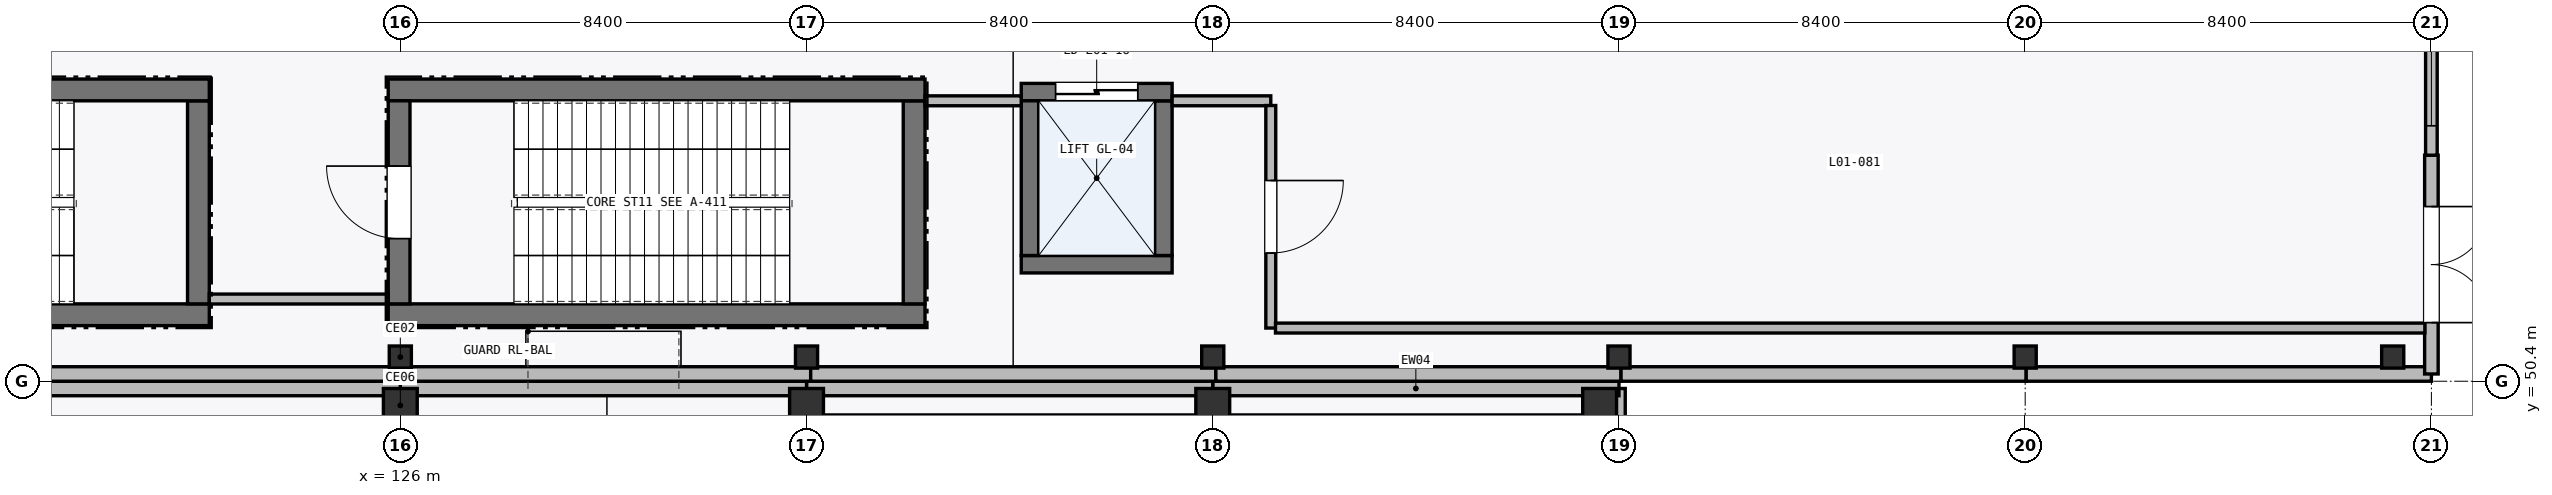
"""IFC4 building model, lengths in metres.
Left out: names, types, materials, properties, quantities, classifications, styles, units other than length and angle.
Written with IfcOpenShell. Run it as: python <this file> out.ifc"""

import sys

from ifc_helpers import new_model, si_unit, direction, frame, frame_2d, origin, origin_2d, place, context, subcontext, project, spatial, rectangle, hollow_circle, extrude, element, fill, save


model = new_model("IFC4")
c1 = context("Model", 3, precision=1e-05, world=origin(), true_north=direction((0.0, 1.0)))
c2 = subcontext(c1, "Body", "Model", "MODEL_VIEW")
j1 = project(units=[si_unit("LENGTHUNIT", "METRE"), si_unit("PLANEANGLEUNIT", "RADIAN")], contexts=[c1])
p1 = place(None, origin())
s1 = spatial("IfcSite", under=j1, at=p1, CompositionType="ELEMENT")
p2 = place(p1, origin())
s2 = spatial("IfcBuilding", under=s1, at=p2, CompositionType="ELEMENT")
p3 = place(p2, origin())
s3 = spatial("IfcBuildingStorey", under=s2, at=p3, CompositionType="ELEMENT", Elevation=0.0)
for number, where, z_axis, x_axis in (
    (1, (126.0, 49.9, 0.0), (0.0, 0.0, 1.0), (1.0, 0.0, 0.0)),
    (2, (134.4, 49.9, 0.0), (0.0, 0.0, 1.0), (1.0, 0.0, 0.0)),
    (3, (142.8, 49.9, 0.0), (0.0, 0.0, 1.0), (1.0, 0.0, 0.0)),
    (4, (150.8, 49.9, 0.0), (0.0, 0.0, 1.0), (1.0, 0.0, 0.0)),
):
    element("IfcColumn", number, at=place(p3, frame(where, z_axis=z_axis, x_axis=x_axis)), inside=s3, PredefinedType="COLUMN", context=c2, shape_type="SweptSolid", body=[
        extrude(rectangle(XDim=0.7, YDim=0.7, at=origin_2d()), origin(), (0.0, 0.0, 1.0), 6.0),
    ])
for number, where, z_axis, x_axis in (
    (5, (126.0, 50.9, 0.0), (0.0, 0.0, 1.0), (1.0, 0.0, 0.0)),
    (6, (134.4, 50.9, 0.0), (0.0, 0.0, 1.0), (1.0, 0.0, 0.0)),
    (7, (142.8, 50.9, 0.0), (0.0, 0.0, 1.0), (1.0, 0.0, 0.0)),
    (8, (151.2, 50.9, 0.0), (0.0, 0.0, 1.0), (1.0, 0.0, 0.0)),
    (9, (159.6, 50.9, 0.0), (0.0, 0.0, 1.0), (1.0, 0.0, 0.0)),
    (10, (167.2, 50.9, 0.0), (0.0, 0.0, 1.0), (1.0, 0.0, 0.0)),
):
    element("IfcColumn", number, at=place(p3, frame(where, z_axis=z_axis, x_axis=x_axis)), inside=s3, PredefinedType="COLUMN", context=c2, shape_type="SweptSolid", body=[
        extrude(hollow_circle(Radius=0.229, WallThickness=0.016, at=origin_2d()), origin(), (0.0, 0.0, 1.0), 6.0),
    ])
p4 = place(p3, frame((151.2, 41.88, 0.0), z_axis=(0.0, 0.0, 1.0), x_axis=(0.0, 1.0, 0.0)))
e11 = element("IfcWall", 11, at=p4, inside=s3, PredefinedType="STANDARD", context=c2, shape_type="SweptSolid", body=[
    extrude(rectangle(XDim=8.37, YDim=0.26, at=frame_2d((4.185, 0.0))), origin(), (0.0, 0.0, 1.0), 5.745),
])
p5 = place(p4, frame((3.035, 0.0, 0.0)))
e12 = element("IfcOpeningElement", 12, at=p5, cuts=e11, PredefinedType="OPENING", context=c2, shape_type="SweptSolid", body=[
    extrude(rectangle(XDim=2.3, YDim=2.4, at=frame_2d((1.15, 1.2))), frame((0.0, 0.14, 0.0), z_axis=(0.0, -1.0, 0.0), x_axis=(1.0, 0.0, 0.0)), (0.0, 0.0, 1.0), 0.28),
])
p6 = place(p3, frame((151.2, 50.25, 0.0), z_axis=(0.0, 0.0, 1.0), x_axis=(-1.0, 0.0, 0.0)))
e13 = element("IfcWall", 13, at=p6, inside=s3, PredefinedType="STANDARD", context=c2, shape_type="SweptSolid", body=[
    extrude(rectangle(XDim=8.4, YDim=0.3, at=frame_2d((4.2, 0.0))), origin(), (0.0, 0.0, 1.0), 5.231),
])
p7 = place(p3, frame((142.8, 50.25, 0.0), z_axis=(0.0, 0.0, 1.0), x_axis=(-1.0, 0.0, 0.0)))
e14 = element("IfcWall", 14, at=p7, inside=s3, PredefinedType="STANDARD", context=c2, shape_type="SweptSolid", body=[
    extrude(rectangle(XDim=8.4, YDim=0.3, at=frame_2d((4.2, 0.0))), origin(), (0.0, 0.0, 1.0), 5.231),
])
for number, where, z_axis, x_axis in (
    (15, (134.4, 50.25, 0.0), (0.0, 0.0, 1.0), (-1.0, 0.0, 0.0)),
    (16, (126.0, 50.25, 0.0), (0.0, 0.0, 1.0), (-1.0, 0.0, 0.0)),
):
    element("IfcWall", number, at=place(p3, frame(where, z_axis=z_axis, x_axis=x_axis)), inside=s3, PredefinedType="STANDARD", context=c2, shape_type="SweptSolid", body=[
        extrude(rectangle(XDim=8.4, YDim=0.3, at=frame_2d((4.2, 0.0))), origin(), (0.0, 0.0, 1.0), 5.231),
    ])
p8 = place(p3, frame((117.729, 50.55, 0.0), z_axis=(0.0, 0.0, 1.0), x_axis=(1.0, 0.0, 0.0)))
e17 = element("IfcWall", 17, at=p8, inside=s3, PredefinedType="STANDARD", context=c2, shape_type="SweptSolid", body=[
    extrude(rectangle(XDim=8.379, YDim=0.3, at=frame_2d((4.189, 0.0))), origin(), (0.0, 0.0, 1.0), 5.297),
])
p9 = place(p3, frame((126.107, 50.55, 0.0), z_axis=(0.0, 0.0, 1.0), x_axis=(1.0, 0.0, 0.0)))
e18 = element("IfcWall", 18, at=p9, inside=s3, PredefinedType="STANDARD", context=c2, shape_type="SweptSolid", body=[
    extrude(rectangle(XDim=8.378, YDim=0.3, at=frame_2d((4.189, 0.0))), origin(), (0.0, 0.0, 1.0), 5.297),
])
for number, where, z_axis, x_axis in (
    (19, (134.486, 50.55, 0.0), (0.0, 0.0, 1.0), (1.0, 0.0, 0.0)),
    (20, (142.864, 50.55, 0.0), (0.0, 0.0, 1.0), (1.0, 0.0, 0.0)),
):
    element("IfcWall", number, at=place(p3, frame(where, z_axis=z_axis, x_axis=x_axis)), inside=s3, PredefinedType="STANDARD", context=c2, shape_type="SweptSolid", body=[
        extrude(rectangle(XDim=8.379, YDim=0.3, at=frame_2d((4.189, 0.0))), origin(), (0.0, 0.0, 1.0), 5.297),
    ])
p10 = place(p3, frame((151.243, 50.55, 0.0), z_axis=(0.0, 0.0, 1.0), x_axis=(1.0, 0.0, 0.0)))
e21 = element("IfcWall", 21, at=p10, inside=s3, PredefinedType="STANDARD", context=c2, shape_type="SweptSolid", body=[
    extrude(rectangle(XDim=8.378, YDim=0.3, at=frame_2d((4.189, 0.0))), origin(), (0.0, 0.0, 1.0), 5.297),
])
p11 = place(p3, frame((159.621, 50.55, 0.0), z_axis=(0.0, 0.0, 1.0), x_axis=(1.0, 0.0, 0.0)))
e22 = element("IfcWall", 22, at=p11, inside=s3, PredefinedType="STANDARD", context=c2, shape_type="SweptSolid", body=[
    extrude(rectangle(XDim=8.379, YDim=0.3, at=frame_2d((4.189, 0.0))), origin(), (0.0, 0.0, 1.0), 5.297),
])
p12 = place(p3, frame((168.0, 50.55, 0.0), z_axis=(0.0, 0.0, 1.0), x_axis=(0.0, 1.0, 0.0)))
e23 = element("IfcWall", 23, at=p12, inside=s3, PredefinedType="STANDARD", context=c2, shape_type="SweptSolid", body=[
    extrude(rectangle(XDim=4.525, YDim=0.28, at=frame_2d((2.262, 0.0))), origin(), (0.0, 0.0, 1.0), 5.745),
])
p13 = place(p12, frame((1.062, 0.0, 0.0)))
e24 = element("IfcOpeningElement", 24, at=p13, cuts=e23, PredefinedType="OPENING", context=c2, shape_type="SweptSolid", body=[
    extrude(rectangle(XDim=2.4, YDim=2.4, at=frame_2d((1.2, 1.2))), frame((0.0, 0.15, 0.0), z_axis=(0.0, -1.0, 0.0), x_axis=(1.0, 0.0, 0.0)), (0.0, 0.0, 1.0), 0.3),
])
p14 = place(p3, frame((168.0, 55.075, 0.0), z_axis=(0.0, 0.0, 1.0), x_axis=(0.0, 1.0, 0.0)))
e25 = element("IfcWall", 25, at=p14, inside=s3, PredefinedType="STANDARD", context=c2, shape_type="SweptSolid", body=[
    extrude(rectangle(XDim=4.525, YDim=0.24, at=frame_2d((2.263, 0.0))), origin(), (0.0, 0.0, 1.0), 5.745),
])
p15 = place(p14, frame((0.608, 0.0, 0.95)))
e26 = element("IfcOpeningElement", 26, at=p15, cuts=e25, PredefinedType="OPENING", context=c2, shape_type="SweptSolid", body=[
    extrude(rectangle(XDim=1.68, YDim=1.8, at=frame_2d((0.84, 0.9))), frame((0.0, 0.13, 0.0), z_axis=(0.0, -1.0, 0.0), x_axis=(1.0, 0.0, 0.0)), (0.0, 0.0, 1.0), 0.26),
])
p16 = place(p3, frame((110.95, 51.775, 0.0), z_axis=(0.0, 0.0, 1.0), x_axis=(1.0, 0.0, 0.0)))
e27 = element("IfcWall", 27, at=p16, inside=s3, PredefinedType="SHEAR", context=c2, shape_type="SweptSolid", body=[
    extrude(rectangle(XDim=11.1, YDim=0.45, at=frame_2d((5.55, 0.0))), origin(), (0.0, 0.0, 1.0), 5.745),
])
p17 = place(p3, frame((121.825, 52.0, 0.0), z_axis=(0.0, 0.0, 1.0), x_axis=(0.0, 1.0, 0.0)))
e28 = element("IfcWall", 28, at=p17, inside=s3, PredefinedType="SHEAR", context=c2, shape_type="SweptSolid", body=[
    extrude(rectangle(XDim=4.2, YDim=0.45, at=frame_2d((2.1, 0.0))), origin(), (0.0, 0.0, 1.0), 5.745),
])
for number, where, z_axis, x_axis in (
    (29, (122.05, 56.425, 0.0), (0.0, 0.0, 1.0), (-1.0, 0.0, 0.0)),
    (30, (125.75, 51.775, 0.0), (0.0, 0.0, 1.0), (1.0, 0.0, 0.0)),
):
    element("IfcWall", number, at=place(p3, frame(where, z_axis=z_axis, x_axis=x_axis)), inside=s3, PredefinedType="SHEAR", context=c2, shape_type="SweptSolid", body=[
        extrude(rectangle(XDim=11.1, YDim=0.45, at=frame_2d((5.55, 0.0))), origin(), (0.0, 0.0, 1.0), 5.745),
    ])
p18 = place(p3, frame((136.625, 52.0, 0.0), z_axis=(0.0, 0.0, 1.0), x_axis=(0.0, 1.0, 0.0)))
e31 = element("IfcWall", 31, at=p18, inside=s3, PredefinedType="SHEAR", context=c2, shape_type="SweptSolid", body=[
    extrude(rectangle(XDim=4.2, YDim=0.45, at=frame_2d((2.1, 0.0))), origin(), (0.0, 0.0, 1.0), 5.745),
])
p19 = place(p3, frame((136.85, 56.425, 0.0), z_axis=(0.0, 0.0, 1.0), x_axis=(-1.0, 0.0, 0.0)))
e32 = element("IfcWall", 32, at=p19, inside=s3, PredefinedType="SHEAR", context=c2, shape_type="SweptSolid", body=[
    extrude(rectangle(XDim=11.1, YDim=0.45, at=frame_2d((5.55, 0.0))), origin(), (0.0, 0.0, 1.0), 5.745),
])
p20 = place(p3, frame((125.975, 56.2, 0.0), z_axis=(0.0, 0.0, 1.0), x_axis=(0.0, -1.0, 0.0)))
e33 = element("IfcWall", 33, at=p20, inside=s3, PredefinedType="SHEAR", context=c2, shape_type="SweptSolid", body=[
    extrude(rectangle(XDim=4.2, YDim=0.45, at=frame_2d((2.1, 0.0))), origin(), (0.0, 0.0, 1.0), 5.745),
])
p21 = place(p20, frame((1.35, 0.0, 0.0)))
e34 = element("IfcOpeningElement", 34, at=p21, cuts=e33, PredefinedType="OPENING", context=c2, shape_type="SweptSolid", body=[
    extrude(rectangle(XDim=1.5, YDim=2.15, at=frame_2d((0.75, 1.075))), frame((0.0, 0.235, 0.0), z_axis=(0.0, -1.0, 0.0), x_axis=(1.0, 0.0, 0.0)), (0.0, 0.0, 1.0), 0.47),
])
p22 = place(p3, frame((138.84, 52.82, 0.0), z_axis=(0.0, 0.0, 1.0), x_axis=(1.0, 0.0, 0.0)))
e35 = element("IfcWall", 35, at=p22, inside=s3, PredefinedType="SHEAR", context=c2, shape_type="SweptSolid", body=[
    extrude(rectangle(XDim=3.12, YDim=0.36, at=frame_2d((1.56, 0.0))), origin(), (0.0, 0.0, 1.0), 5.745),
])
p23 = place(p3, frame((141.78, 53.0, 0.0), z_axis=(0.0, 0.0, 1.0), x_axis=(0.0, 1.0, 0.0)))
e36 = element("IfcWall", 36, at=p23, inside=s3, PredefinedType="SHEAR", context=c2, shape_type="SweptSolid", body=[
    extrude(rectangle(XDim=3.2, YDim=0.36, at=frame_2d((1.6, 0.0))), origin(), (0.0, 0.0, 1.0), 5.745),
])
p24 = place(p3, frame((141.96, 56.38, 0.0), z_axis=(0.0, 0.0, 1.0), x_axis=(-1.0, 0.0, 0.0)))
e37 = element("IfcWall", 37, at=p24, inside=s3, PredefinedType="SHEAR", context=c2, shape_type="SweptSolid", body=[
    extrude(rectangle(XDim=3.12, YDim=0.36, at=frame_2d((1.56, 0.0))), origin(), (0.0, 0.0, 1.0), 5.745),
])
p25 = place(p24, frame((0.71, 0.0, 0.0)))
e38 = element("IfcOpeningElement", 38, at=p25, cuts=e37, PredefinedType="OPENING", context=c2, shape_type="SweptSolid", body=[
    extrude(rectangle(XDim=1.7, YDim=2.3, at=frame_2d((0.85, 1.15))), frame((0.0, 0.19, 0.0), z_axis=(0.0, -1.0, 0.0), x_axis=(1.0, 0.0, 0.0)), (0.0, 0.0, 1.0), 0.38),
])
p26 = place(p3, frame((139.02, 56.2, 0.0), z_axis=(0.0, 0.0, 1.0), x_axis=(0.0, -1.0, 0.0)))
e39 = element("IfcWall", 39, at=p26, inside=s3, PredefinedType="SHEAR", context=c2, shape_type="SweptSolid", body=[
    extrude(rectangle(XDim=3.2, YDim=0.36, at=frame_2d((1.6, 0.0))), origin(), (0.0, 0.0, 1.0), 5.745),
])
p27 = place(p3, frame((151.075, 49.6, 0.0), z_axis=(0.0, 0.0, 1.0), x_axis=(-1.0, 0.0, 0.0)))
e40 = element("IfcWall", 40, at=p27, inside=s3, PredefinedType="PARTITIONING", context=c2, shape_type="SweptSolid", body=[
    extrude(rectangle(XDim=16.275, YDim=0.205, at=frame_2d((8.137, 0.0))), origin(), (0.0, 0.0, 1.0), 5.231),
])
p28 = place(p3, frame((136.85, 56.2, 0.0), z_axis=(0.0, 0.0, 1.0), x_axis=(1.0, 0.0, 0.0)))
e41 = element("IfcWall", 41, at=p28, inside=s3, PredefinedType="PARTITIONING", context=c2, shape_type="SweptSolid", body=[
    extrude(rectangle(XDim=1.99, YDim=0.205, at=frame_2d((0.995, 0.0))), origin(), (0.0, 0.0, 1.0), 5.745),
])
p29 = place(p3, frame((141.96, 56.2, 0.0), z_axis=(0.0, 0.0, 1.0), x_axis=(1.0, 0.0, 0.0)))
e42 = element("IfcWall", 42, at=p29, inside=s3, PredefinedType="PARTITIONING", context=c2, shape_type="SweptSolid", body=[
    extrude(rectangle(XDim=2.04, YDim=0.205, at=frame_2d((1.02, 0.0))), origin(), (0.0, 0.0, 1.0), 5.745),
])
p30 = place(p3, frame((144.0, 56.103, 0.0), z_axis=(0.0, 0.0, 1.0), x_axis=(0.0, -1.0, 0.0)))
e43 = element("IfcWall", 43, at=p30, inside=s3, PredefinedType="PARTITIONING", context=c2, shape_type="SweptSolid", body=[
    extrude(rectangle(XDim=4.603, YDim=0.205, at=frame_2d((2.301, 0.0))), origin(), (0.0, 0.0, 1.0), 5.745),
])
p31 = place(p30, frame((1.551, 0.0, 0.0)))
e44 = element("IfcOpeningElement", 44, at=p31, cuts=e43, PredefinedType="OPENING", context=c2, shape_type="SweptSolid", body=[
    extrude(rectangle(XDim=1.5, YDim=2.15, at=frame_2d((0.75, 1.075))), frame((0.0, 0.113, 0.0), z_axis=(0.0, -1.0, 0.0), x_axis=(1.0, 0.0, 0.0)), (0.0, 0.0, 1.0), 0.225),
])
p32 = place(p3, frame((144.097, 51.5, 0.0), z_axis=(0.0, 0.0, 1.0), x_axis=(1.0, 0.0, 0.0)))
e45 = element("IfcWall", 45, at=p32, inside=s3, PredefinedType="PARTITIONING", context=c2, shape_type="SweptSolid", body=[
    extrude(rectangle(XDim=23.768, YDim=0.205, at=frame_2d((11.884, 0.0))), origin(), (0.0, 0.0, 1.0), 5.745),
])
p33 = place(p3, frame((122.05, 52.1, 0.0), z_axis=(0.0, 0.0, 1.0), x_axis=(1.0, 0.0, 0.0)))
e46 = element("IfcWall", 46, at=p33, inside=s3, PredefinedType="PARTITIONING", context=c2, shape_type="SweptSolid", body=[
    extrude(rectangle(XDim=3.7, YDim=0.205, at=frame_2d((1.85, 0.0))), origin(), (0.0, 0.0, 1.0), 5.745),
])
p34 = place(p13, frame((2.4, 0.0, 0.0), z_axis=(0.0, 0.0, 1.0), x_axis=(-1.0, 0.0, 0.0)))
e47 = element("IfcDoor", 47, at=p34, inside=s3, OperationType="DOUBLE_DOOR_SINGLE_SWING", PredefinedType="DOOR", context=c2, shape_type="SweptSolid", body=[
    extrude(rectangle(XDim=2.4, YDim=2.4, at=frame_2d((1.2, 1.2))), frame((0.0, 0.025, 0.0), z_axis=(0.0, -1.0, 0.0), x_axis=(1.0, 0.0, 0.0)), (0.0, 0.0, 1.0), 0.05),
])
fill(e24, e47)
p35 = place(p15, origin())
e48 = element("IfcWindow", 48, at=p35, inside=s3, PartitioningType="SINGLE_PANEL", PredefinedType="WINDOW", context=c2, shape_type="SweptSolid", body=[
    extrude(rectangle(XDim=1.68, YDim=1.8, at=frame_2d((0.84, 0.9))), frame((0.0, 0.03, 0.0), z_axis=(0.0, -1.0, 0.0), x_axis=(1.0, 0.0, 0.0)), (0.0, 0.0, 1.0), 0.06),
])
fill(e26, e48)
p36 = place(p21, frame((1.5, 0.0, 0.0), z_axis=(0.0, 0.0, 1.0), x_axis=(-1.0, 0.0, 0.0)))
e49 = element("IfcDoor", 49, at=p36, inside=s3, OperationType="SINGLE_SWING_LEFT", PredefinedType="DOOR", context=c2, shape_type="SweptSolid", body=[
    extrude(rectangle(XDim=1.5, YDim=2.15, at=frame_2d((0.75, 1.075))), frame((0.0, 0.025, 0.0), z_axis=(0.0, -1.0, 0.0), x_axis=(1.0, 0.0, 0.0)), (0.0, 0.0, 1.0), 0.05),
])
fill(e34, e49)
p37 = place(p25, frame((1.7, 0.0, 0.0), z_axis=(0.0, 0.0, 1.0), x_axis=(-1.0, 0.0, 0.0)))
e50 = element("IfcDoor", 50, at=p37, inside=s3, OperationType="DOUBLE_DOOR_SLIDING", PredefinedType="DOOR", context=c2, shape_type="SweptSolid", body=[
    extrude(rectangle(XDim=1.7, YDim=2.3, at=frame_2d((0.85, 1.15))), frame((0.0, 0.025, 0.0), z_axis=(0.0, -1.0, 0.0), x_axis=(1.0, 0.0, 0.0)), (0.0, 0.0, 1.0), 0.05),
])
fill(e38, e50)
p38 = place(p31, origin())
e51 = element("IfcDoor", 51, at=p38, inside=s3, OperationType="SINGLE_SWING_LEFT", PredefinedType="DOOR", context=c2, shape_type="SweptSolid", body=[
    extrude(rectangle(XDim=1.5, YDim=2.15, at=frame_2d((0.75, 1.075))), frame((0.0, 0.025, 0.0), z_axis=(0.0, -1.0, 0.0), x_axis=(1.0, 0.0, 0.0)), (0.0, 0.0, 1.0), 0.05),
])
fill(e44, e51)
save(model, sys.argv[1])
